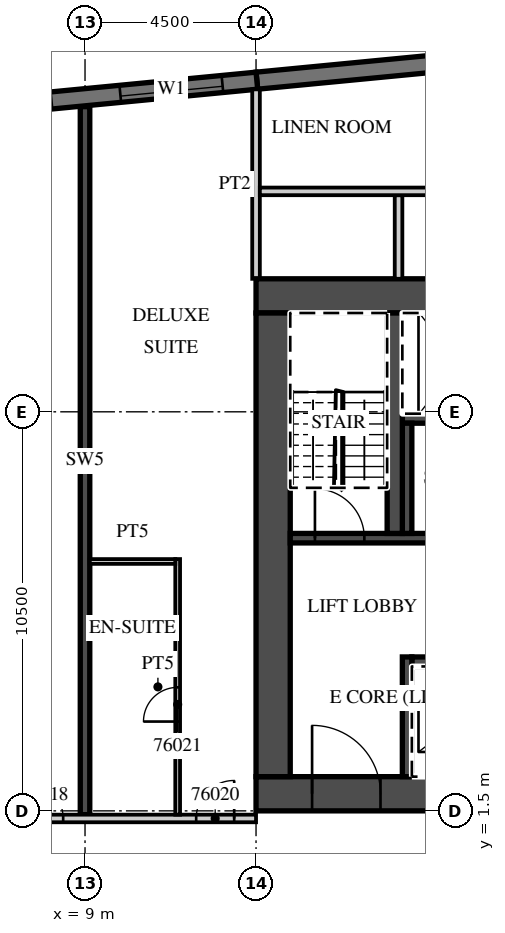
"""IFC4 building model, lengths in metres.
Left out: names, types, materials, properties, quantities, classifications, styles, units other than length and angle.
Written with IfcOpenShell. Run it as: python <this file> out.ifc"""

import sys

from ifc_helpers import new_model, si_unit, direction, frame, frame_2d, origin, place, context, subcontext, project, spatial, rectangle, extrude, element, fill, save


model = new_model("IFC4")
c1 = context("Model", 3, precision=1e-05, world=origin(), true_north=direction((0.0, 1.0)))
c2 = subcontext(c1, "Body", "Model", "MODEL_VIEW")
j1 = project(units=[si_unit("LENGTHUNIT", "METRE"), si_unit("PLANEANGLEUNIT", "RADIAN")], contexts=[c1])
p1 = place(None, origin())
s1 = spatial("IfcSite", under=j1, at=p1, CompositionType="ELEMENT")
p2 = place(p1, origin())
s2 = spatial("IfcBuilding", under=s1, at=p2, CompositionType="ELEMENT")
p3 = place(p2, frame((0.0, 0.0, 301.5)))
s3 = spatial("IfcBuildingStorey", under=s2, at=p3, CompositionType="ELEMENT", Elevation=301.5)
p4 = place(p3, frame((9.0, 1.4, 0.0), z_axis=(0.0, 0.0, 1.0), x_axis=(0.0, 1.0, 0.0)))
e1 = element("IfcWall", 1, at=p4, inside=s3, PredefinedType="SHEAR", context=c2, shape_type="SweptSolid", body=[
    extrude(rectangle(XDim=18.629, YDim=0.25, at=frame_2d((9.315, 0.0))), origin(), (0.0, 0.0, 1.0), 3.3),
])
p5 = place(p3, frame((30.946, 22.391, 0.0), z_axis=(0.0, 0.0, 1.0), x_axis=(-0.995396397117, -0.095843688398, 0.0)))
e2 = element("IfcWall", 2, at=p5, inside=s3, PredefinedType="SOLIDWALL", context=c2, shape_type="SweptSolid", body=[
    extrude(rectangle(XDim=17.505, YDim=0.45, at=frame_2d((8.752, 0.0))), origin(), (0.0, 0.0, 1.0), 3.02),
])
p6 = place(p3, frame((13.521, 20.713, 0.0), z_axis=(0.0, 0.0, 1.0), x_axis=(-0.995396277313, -0.095844932638, 0.0)))
e3 = element("IfcWall", 3, at=p6, inside=s3, PredefinedType="SOLIDWALL", context=c2, shape_type="SweptSolid", body=[
    extrude(rectangle(XDim=51.495, YDim=0.45, at=frame_2d((25.748, 0.0))), origin(), (0.0, 0.0, 1.0), 3.02),
])
p7 = place(p6, frame((0.91, 0.0, 0.45)))
e4 = element("IfcOpeningElement", 4, at=p7, cuts=e3, PredefinedType="OPENING", context=c2, shape_type="SweptSolid", body=[
    extrude(rectangle(XDim=2.7, YDim=2.25, at=frame_2d((1.35, 1.125))), frame((0.0, 0.235, 0.0), z_axis=(0.0, -1.0, 0.0), x_axis=(1.0, 0.0, 0.0)), (0.0, 0.0, 1.0), 0.47),
])
p8 = place(p6, frame((5.431, 0.0, 0.45)))
e5 = element("IfcOpeningElement", 5, at=p8, cuts=e3, PredefinedType="OPENING", context=c2, shape_type="SweptSolid", body=[
    extrude(rectangle(XDim=2.7, YDim=2.25, at=frame_2d((1.35, 1.125))), frame((0.0, 0.235, 0.0), z_axis=(0.0, -1.0, 0.0), x_axis=(1.0, 0.0, 0.0)), (0.0, 0.0, 1.0), 0.47),
])
p9 = place(p6, frame((9.952, 0.0, 0.45)))
e6 = element("IfcOpeningElement", 6, at=p9, cuts=e3, PredefinedType="OPENING", context=c2, shape_type="SweptSolid", body=[
    extrude(rectangle(XDim=2.7, YDim=2.25, at=frame_2d((1.35, 1.125))), frame((0.0, 0.235, 0.0), z_axis=(0.0, -1.0, 0.0), x_axis=(1.0, 0.0, 0.0)), (0.0, 0.0, 1.0), 0.47),
])
p10 = place(p6, frame((14.473, 0.0, 0.45)))
e7 = element("IfcOpeningElement", 7, at=p10, cuts=e3, PredefinedType="OPENING", context=c2, shape_type="SweptSolid", body=[
    extrude(rectangle(XDim=2.7, YDim=2.25, at=frame_2d((1.35, 1.125))), frame((0.0, 0.235, 0.0), z_axis=(0.0, -1.0, 0.0), x_axis=(1.0, 0.0, 0.0)), (0.0, 0.0, 1.0), 0.47),
])
p11 = place(p6, frame((18.994, 0.0, 0.45)))
e8 = element("IfcOpeningElement", 8, at=p11, cuts=e3, PredefinedType="OPENING", context=c2, shape_type="SweptSolid", body=[
    extrude(rectangle(XDim=2.7, YDim=2.25, at=frame_2d((1.35, 1.125))), frame((0.0, 0.235, 0.0), z_axis=(0.0, -1.0, 0.0), x_axis=(1.0, 0.0, 0.0)), (0.0, 0.0, 1.0), 0.47),
])
p12 = place(p6, frame((23.514, 0.0, 0.45)))
e9 = element("IfcOpeningElement", 9, at=p12, cuts=e3, PredefinedType="OPENING", context=c2, shape_type="SweptSolid", body=[
    extrude(rectangle(XDim=2.7, YDim=2.25, at=frame_2d((1.35, 1.125))), frame((0.0, 0.235, 0.0), z_axis=(0.0, -1.0, 0.0), x_axis=(1.0, 0.0, 0.0)), (0.0, 0.0, 1.0), 0.47),
])
p13 = place(p6, frame((28.035, 0.0, 0.45)))
e10 = element("IfcOpeningElement", 10, at=p13, cuts=e3, PredefinedType="OPENING", context=c2, shape_type="SweptSolid", body=[
    extrude(rectangle(XDim=2.7, YDim=2.25, at=frame_2d((1.35, 1.125))), frame((0.0, 0.235, 0.0), z_axis=(0.0, -1.0, 0.0), x_axis=(1.0, 0.0, 0.0)), (0.0, 0.0, 1.0), 0.47),
])
p14 = place(p6, frame((32.556, 0.0, 0.45)))
e11 = element("IfcOpeningElement", 11, at=p14, cuts=e3, PredefinedType="OPENING", context=c2, shape_type="SweptSolid", body=[
    extrude(rectangle(XDim=2.7, YDim=2.25, at=frame_2d((1.35, 1.125))), frame((0.0, 0.235, 0.0), z_axis=(0.0, -1.0, 0.0), x_axis=(1.0, 0.0, 0.0)), (0.0, 0.0, 1.0), 0.47),
])
p15 = place(p6, frame((37.077, 0.0, 0.45)))
e12 = element("IfcOpeningElement", 12, at=p15, cuts=e3, PredefinedType="OPENING", context=c2, shape_type="SweptSolid", body=[
    extrude(rectangle(XDim=2.7, YDim=2.25, at=frame_2d((1.35, 1.125))), frame((0.0, 0.235, 0.0), z_axis=(0.0, -1.0, 0.0), x_axis=(1.0, 0.0, 0.0)), (0.0, 0.0, 1.0), 0.47),
])
p16 = place(p6, frame((41.598, 0.0, 0.45)))
e13 = element("IfcOpeningElement", 13, at=p16, cuts=e3, PredefinedType="OPENING", context=c2, shape_type="SweptSolid", body=[
    extrude(rectangle(XDim=2.7, YDim=2.25, at=frame_2d((1.35, 1.125))), frame((0.0, 0.235, 0.0), z_axis=(0.0, -1.0, 0.0), x_axis=(1.0, 0.0, 0.0)), (0.0, 0.0, 1.0), 0.47),
])
p17 = place(p6, frame((46.118, 0.0, 0.45)))
e14 = element("IfcOpeningElement", 14, at=p17, cuts=e3, PredefinedType="OPENING", context=c2, shape_type="SweptSolid", body=[
    extrude(rectangle(XDim=2.7, YDim=2.25, at=frame_2d((1.35, 1.125))), frame((0.0, 0.235, 0.0), z_axis=(0.0, -1.0, 0.0), x_axis=(1.0, 0.0, 0.0)), (0.0, 0.0, 1.0), 0.47),
])
p18 = place(p3, frame((13.5, 15.5, 0.0), z_axis=(0.0, 0.0, 1.0), x_axis=(0.0, 1.0, 0.0)))
e15 = element("IfcWall", 15, at=p18, inside=s3, PredefinedType="PARTITIONING", context=c2, shape_type="SweptSolid", body=[
    extrude(rectangle(XDim=4.985, YDim=0.2, at=frame_2d((2.493, 0.0))), origin(), (0.0, 0.0, 1.0), 3.02),
])
p19 = place(p3, frame((-39.909, 1.3, 0.0), z_axis=(0.0, 0.0, 1.0), x_axis=(1.0, 0.0, 0.0)))
e16 = element("IfcWall", 16, at=p19, inside=s3, PredefinedType="PARTITIONING", context=c2, shape_type="SweptSolid", body=[
    extrude(rectangle(XDim=53.409, YDim=0.2, at=frame_2d((26.705, 0.0))), origin(), (0.0, 0.0, 1.0), 3.02),
])
p20 = place(p19, frame((0.15, 0.0, 0.0)))
e17 = element("IfcOpeningElement", 17, at=p20, cuts=e16, PredefinedType="OPENING", context=c2, shape_type="SweptSolid", body=[
    extrude(rectangle(XDim=0.9, YDim=2.1, at=frame_2d((0.45, 1.05))), frame((0.0, 0.11, 0.0), z_axis=(0.0, -1.0, 0.0), x_axis=(1.0, 0.0, 0.0)), (0.0, 0.0, 1.0), 0.22),
])
p21 = place(p19, frame((9.271, 0.0, 0.0)))
e18 = element("IfcOpeningElement", 18, at=p21, cuts=e16, PredefinedType="OPENING", context=c2, shape_type="SweptSolid", body=[
    extrude(rectangle(XDim=1.2, YDim=2.1, at=frame_2d((0.6, 1.05))), frame((0.0, 0.11, 0.0), z_axis=(0.0, -1.0, 0.0), x_axis=(1.0, 0.0, 0.0)), (0.0, 0.0, 1.0), 0.22),
])
p22 = place(p19, frame((13.484, 0.0, 0.0)))
e19 = element("IfcOpeningElement", 19, at=p22, cuts=e16, PredefinedType="OPENING", context=c2, shape_type="SweptSolid", body=[
    extrude(rectangle(XDim=1.0, YDim=2.1, at=frame_2d((0.5, 1.05))), frame((0.0, 0.11, 0.0), z_axis=(0.0, -1.0, 0.0), x_axis=(1.0, 0.0, 0.0)), (0.0, 0.0, 1.0), 0.22),
])
p23 = place(p19, frame((17.959, 0.0, 0.0)))
e20 = element("IfcOpeningElement", 20, at=p23, cuts=e16, PredefinedType="OPENING", context=c2, shape_type="SweptSolid", body=[
    extrude(rectangle(XDim=1.0, YDim=2.1, at=frame_2d((0.5, 1.05))), frame((0.0, 0.11, 0.0), z_axis=(0.0, -1.0, 0.0), x_axis=(1.0, 0.0, 0.0)), (0.0, 0.0, 1.0), 0.22),
])
p24 = place(p19, frame((24.859, 0.0, 0.0)))
e21 = element("IfcOpeningElement", 21, at=p24, cuts=e16, PredefinedType="OPENING", context=c2, shape_type="SweptSolid", body=[
    extrude(rectangle(XDim=1.0, YDim=2.1, at=frame_2d((0.5, 1.05))), frame((0.0, 0.11, 0.0), z_axis=(0.0, -1.0, 0.0), x_axis=(1.0, 0.0, 0.0)), (0.0, 0.0, 1.0), 0.22),
])
p25 = place(p19, frame((29.334, 0.0, 0.0)))
e22 = element("IfcOpeningElement", 22, at=p25, cuts=e16, PredefinedType="OPENING", context=c2, shape_type="SweptSolid", body=[
    extrude(rectangle(XDim=1.0, YDim=2.1, at=frame_2d((0.5, 1.05))), frame((0.0, 0.11, 0.0), z_axis=(0.0, -1.0, 0.0), x_axis=(1.0, 0.0, 0.0)), (0.0, 0.0, 1.0), 0.22),
])
p26 = place(p19, frame((36.271, 0.0, 0.0)))
e23 = element("IfcOpeningElement", 23, at=p26, cuts=e16, PredefinedType="OPENING", context=c2, shape_type="SweptSolid", body=[
    extrude(rectangle(XDim=1.2, YDim=2.1, at=frame_2d((0.6, 1.05))), frame((0.0, 0.11, 0.0), z_axis=(0.0, -1.0, 0.0), x_axis=(1.0, 0.0, 0.0)), (0.0, 0.0, 1.0), 0.22),
])
p27 = place(p19, frame((40.484, 0.0, 0.0)))
e24 = element("IfcOpeningElement", 24, at=p27, cuts=e16, PredefinedType="OPENING", context=c2, shape_type="SweptSolid", body=[
    extrude(rectangle(XDim=1.0, YDim=2.1, at=frame_2d((0.5, 1.05))), frame((0.0, 0.11, 0.0), z_axis=(0.0, -1.0, 0.0), x_axis=(1.0, 0.0, 0.0)), (0.0, 0.0, 1.0), 0.22),
])
p28 = place(p19, frame((47.334, 0.0, 0.0)))
e25 = element("IfcOpeningElement", 25, at=p28, cuts=e16, PredefinedType="OPENING", context=c2, shape_type="SweptSolid", body=[
    extrude(rectangle(XDim=1.0, YDim=2.1, at=frame_2d((0.5, 1.05))), frame((0.0, 0.11, 0.0), z_axis=(0.0, -1.0, 0.0), x_axis=(1.0, 0.0, 0.0)), (0.0, 0.0, 1.0), 0.22),
])
p29 = place(p19, frame((51.834, 0.0, 0.0)))
e26 = element("IfcOpeningElement", 26, at=p29, cuts=e16, PredefinedType="OPENING", context=c2, shape_type="SweptSolid", body=[
    extrude(rectangle(XDim=1.0, YDim=2.1, at=frame_2d((0.5, 1.05))), frame((0.0, 0.11, 0.0), z_axis=(0.0, -1.0, 0.0), x_axis=(1.0, 0.0, 0.0)), (0.0, 0.0, 1.0), 0.22),
])
p30 = place(p3, frame((11.438, 1.4, 0.0), z_axis=(0.0, 0.0, 1.0), x_axis=(0.0, 1.0, 0.0)))
e27 = element("IfcWall", 27, at=p30, inside=s3, PredefinedType="PARTITIONING", context=c2, shape_type="SweptSolid", body=[
    extrude(rectangle(XDim=6.725, YDim=0.125, at=frame_2d((3.363, 0.0))), origin(), (0.0, 0.0, 1.0), 3.02),
])
p31 = place(p30, frame((2.45, 0.0, 0.0)))
e28 = element("IfcOpeningElement", 28, at=p31, cuts=e27, PredefinedType="OPENING", context=c2, shape_type="SweptSolid", body=[
    extrude(rectangle(XDim=0.9, YDim=2.1, at=frame_2d((0.45, 1.05))), frame((0.0, 0.073, 0.0), z_axis=(0.0, -1.0, 0.0), x_axis=(1.0, 0.0, 0.0)), (0.0, 0.0, 1.0), 0.145),
])
p32 = place(p3, frame((9.125, 8.062, 0.0), z_axis=(0.0, 0.0, 1.0), x_axis=(1.0, 0.0, 0.0)))
e29 = element("IfcWall", 29, at=p32, inside=s3, PredefinedType="PARTITIONING", context=c2, shape_type="SweptSolid", body=[
    extrude(rectangle(XDim=2.25, YDim=0.125, at=frame_2d((1.125, 0.0))), origin(), (0.0, 0.0, 1.0), 3.02),
])
p33 = place(p3, frame((13.5, 1.95, 0.0), z_axis=(0.0, 0.0, 1.0), x_axis=(1.0, 0.0, 0.0)))
e30 = element("IfcWall", 30, at=p33, inside=s3, PredefinedType="SHEAR", context=c2, shape_type="SweptSolid", body=[
    extrude(rectangle(XDim=18.0, YDim=0.9, at=frame_2d((9.0, 0.0))), origin(), (0.0, 0.0, 1.0), 3.02),
])
p34 = place(p33, frame((1.475, 0.0, 0.0)))
e31 = element("IfcOpeningElement", 31, at=p34, cuts=e30, PredefinedType="OPENING", context=c2, shape_type="SweptSolid", body=[
    extrude(rectangle(XDim=1.8, YDim=2.1, at=frame_2d((0.9, 1.05))), frame((0.0, 0.46, 0.0), z_axis=(0.0, -1.0, 0.0), x_axis=(1.0, 0.0, 0.0)), (0.0, 0.0, 1.0), 0.92),
])
p35 = place(p3, frame((13.5, 15.05, 0.0), z_axis=(0.0, 0.0, 1.0), x_axis=(1.0, 0.0, 0.0)))
e32 = element("IfcWall", 32, at=p35, inside=s3, PredefinedType="SHEAR", context=c2, shape_type="SweptSolid", body=[
    extrude(rectangle(XDim=6.8, YDim=0.9, at=frame_2d((3.4, 0.0))), origin(), (0.0, 0.0, 1.0), 3.02),
])
p36 = place(p35, frame((4.725, 0.0, 0.0)))
e33 = element("IfcOpeningElement", 33, at=p36, cuts=e32, PredefinedType="OPENING", context=c2, shape_type="SweptSolid", body=[
    extrude(rectangle(XDim=1.2, YDim=2.1, at=frame_2d((0.6, 1.05))), frame((0.0, 0.46, 0.0), z_axis=(0.0, -1.0, 0.0), x_axis=(1.0, 0.0, 0.0)), (0.0, 0.0, 1.0), 0.92),
])
p37 = place(p3, frame((13.95, 2.4, 0.0), z_axis=(0.0, 0.0, 1.0), x_axis=(0.0, 1.0, 0.0)))
e34 = element("IfcWall", 34, at=p37, inside=s3, PredefinedType="SHEAR", context=c2, shape_type="SweptSolid", body=[
    extrude(rectangle(XDim=12.2, YDim=0.9, at=frame_2d((6.1, 0.0))), origin(), (0.0, 0.0, 1.0), 3.02),
])
p38 = place(p3, frame((17.6, 5.425, 0.0), z_axis=(0.0, 0.0, 1.0), x_axis=(1.0, 0.0, 0.0)))
e35 = element("IfcWall", 35, at=p38, inside=s3, PredefinedType="SHEAR", context=c2, shape_type="SweptSolid", body=[
    extrude(rectangle(XDim=13.0, YDim=0.25, at=frame_2d((6.5, 0.0))), origin(), (0.0, 0.0, 1.0), 3.02),
])
p39 = place(p38, frame((3.275, 0.0, 0.0)))
e36 = element("IfcOpeningElement", 36, at=p39, cuts=e35, PredefinedType="OPENING", context=c2, shape_type="SweptSolid", body=[
    extrude(rectangle(XDim=1.2, YDim=2.1, at=frame_2d((0.6, 1.05))), frame((0.0, 0.135, 0.0), z_axis=(0.0, -1.0, 0.0), x_axis=(1.0, 0.0, 0.0)), (0.0, 0.0, 1.0), 0.27),
])
p40 = place(p38, frame((0.625, 0.0, 0.0)))
e37 = element("IfcOpeningElement", 37, at=p40, cuts=e35, PredefinedType="OPENING", context=c2, shape_type="SweptSolid", body=[
    extrude(rectangle(XDim=1.2, YDim=2.1, at=frame_2d((0.6, 1.05))), frame((0.0, 0.135, 0.0), z_axis=(0.0, -1.0, 0.0), x_axis=(1.0, 0.0, 0.0)), (0.0, 0.0, 1.0), 0.27),
])
p41 = place(p38, frame((7.275, 0.0, 0.0)))
e38 = element("IfcOpeningElement", 38, at=p41, cuts=e35, PredefinedType="OPENING", context=c2, shape_type="SweptSolid", body=[
    extrude(rectangle(XDim=1.0, YDim=2.1, at=frame_2d((0.5, 1.05))), frame((0.0, 0.135, 0.0), z_axis=(0.0, -1.0, 0.0), x_axis=(1.0, 0.0, 0.0)), (0.0, 0.0, 1.0), 0.27),
])
p42 = place(p3, frame((17.475, 2.4, 0.0), z_axis=(0.0, 0.0, 1.0), x_axis=(0.0, 1.0, 0.0)))
e39 = element("IfcWall", 39, at=p42, inside=s3, PredefinedType="SHEAR", context=c2, shape_type="SweptSolid", body=[
    extrude(rectangle(XDim=3.15, YDim=0.25, at=frame_2d((1.575, 0.0))), origin(), (0.0, 0.0, 1.0), 3.02),
])
p43 = place(p3, frame((14.4, 8.675, 0.0), z_axis=(0.0, 0.0, 1.0), x_axis=(1.0, 0.0, 0.0)))
e40 = element("IfcWall", 40, at=p43, inside=s3, PredefinedType="SHEAR", context=c2, shape_type="SweptSolid", body=[
    extrude(rectangle(XDim=16.2, YDim=0.25, at=frame_2d((8.1, 0.0))), origin(), (0.0, 0.0, 1.0), 3.02),
])
p44 = place(p43, frame((0.65, 0.0, 0.0)))
e41 = element("IfcOpeningElement", 41, at=p44, cuts=e40, PredefinedType="OPENING", context=c2, shape_type="SweptSolid", body=[
    extrude(rectangle(XDim=1.3, YDim=2.1, at=frame_2d((0.65, 1.05))), frame((0.0, 0.135, 0.0), z_axis=(0.0, -1.0, 0.0), x_axis=(1.0, 0.0, 0.0)), (0.0, 0.0, 1.0), 0.27),
])
p45 = place(p43, frame((12.962, 0.0, 0.0)))
e42 = element("IfcOpeningElement", 42, at=p45, cuts=e40, PredefinedType="OPENING", context=c2, shape_type="SweptSolid", body=[
    extrude(rectangle(XDim=1.0, YDim=2.1, at=frame_2d((0.5, 1.05))), frame((0.0, 0.135, 0.0), z_axis=(0.0, -1.0, 0.0), x_axis=(1.0, 0.0, 0.0)), (0.0, 0.0, 1.0), 0.27),
])
p46 = place(p43, frame((8.1, 0.0, 0.0)))
e43 = element("IfcOpeningElement", 43, at=p46, cuts=e40, PredefinedType="OPENING", context=c2, shape_type="SweptSolid", body=[
    extrude(rectangle(XDim=1.0, YDim=2.1, at=frame_2d((0.5, 1.05))), frame((0.0, 0.135, 0.0), z_axis=(0.0, -1.0, 0.0), x_axis=(1.0, 0.0, 0.0)), (0.0, 0.0, 1.0), 0.27),
])
p47 = place(p43, frame((4.212, 0.0, 0.0)))
e44 = element("IfcOpeningElement", 44, at=p47, cuts=e40, PredefinedType="OPENING", context=c2, shape_type="SweptSolid", body=[
    extrude(rectangle(XDim=1.0, YDim=2.1, at=frame_2d((0.5, 1.05))), frame((0.0, 0.135, 0.0), z_axis=(0.0, -1.0, 0.0), x_axis=(1.0, 0.0, 0.0)), (0.0, 0.0, 1.0), 0.27),
])
p48 = place(p3, frame((17.35, 11.825, 0.0), z_axis=(0.0, 0.0, 1.0), x_axis=(1.0, 0.0, 0.0)))
e45 = element("IfcWall", 45, at=p48, inside=s3, PredefinedType="SHEAR", context=c2, shape_type="SweptSolid", body=[
    extrude(rectangle(XDim=13.25, YDim=0.25, at=frame_2d((6.625, 0.0))), origin(), (0.0, 0.0, 1.0), 3.02),
])
p49 = place(p3, frame((17.475, 8.8, 0.0), z_axis=(0.0, 0.0, 1.0), x_axis=(0.0, 1.0, 0.0)))
e46 = element("IfcWall", 46, at=p49, inside=s3, PredefinedType="SHEAR", context=c2, shape_type="SweptSolid", body=[
    extrude(rectangle(XDim=2.9, YDim=0.25, at=frame_2d((1.45, 0.0))), origin(), (0.0, 0.0, 1.0), 3.02),
])
p50 = place(p3, frame((17.15, 8.8, 0.0), z_axis=(0.0, 0.0, 1.0), x_axis=(0.0, 1.0, 0.0)))
e47 = element("IfcWall", 47, at=p50, inside=s3, PredefinedType="SHEAR", context=c2, shape_type="SweptSolid", body=[
    extrude(rectangle(XDim=5.8, YDim=0.4, at=frame_2d((2.9, 0.0))), origin(), (0.0, 0.0, 1.0), 3.02),
])
p51 = place(p3, frame((17.25, 15.5, 0.0), z_axis=(0.0, 0.0, 1.0), x_axis=(0.0, 1.0, 0.0)))
e48 = element("IfcWall", 48, at=p51, inside=s3, PredefinedType="PARTITIONING", context=c2, shape_type="SweptSolid", body=[
    extrude(rectangle(XDim=2.2, YDim=0.2, at=frame_2d((1.1, 0.0))), origin(), (0.0, 0.0, 1.0), 3.02),
])
p52 = place(p3, frame((13.6, 17.8, 0.0), z_axis=(0.0, 0.0, 1.0), x_axis=(1.0, 0.0, 0.0)))
e49 = element("IfcWall", 49, at=p52, inside=s3, PredefinedType="PARTITIONING", context=c2, shape_type="SweptSolid", body=[
    extrude(rectangle(XDim=21.354, YDim=0.2, at=frame_2d((10.677, 0.0))), origin(), (0.0, 0.0, 1.0), 3.02),
])
p53 = place(p52, frame((16.613, 0.0, 0.0)))
e50 = element("IfcOpeningElement", 50, at=p53, cuts=e49, PredefinedType="OPENING", context=c2, shape_type="SweptSolid", body=[
    extrude(rectangle(XDim=0.9, YDim=2.1, at=frame_2d((0.45, 1.05))), frame((0.0, 0.11, 0.0), z_axis=(0.0, -1.0, 0.0), x_axis=(1.0, 0.0, 0.0)), (0.0, 0.0, 1.0), 0.22),
])
p54 = place(p52, frame((8.312, 0.0, 0.0)))
e51 = element("IfcOpeningElement", 51, at=p54, cuts=e49, PredefinedType="OPENING", context=c2, shape_type="SweptSolid", body=[
    extrude(rectangle(XDim=0.9, YDim=2.1, at=frame_2d((0.45, 1.05))), frame((0.0, 0.11, 0.0), z_axis=(0.0, -1.0, 0.0), x_axis=(1.0, 0.0, 0.0)), (0.0, 0.0, 1.0), 0.22),
])
p55 = place(p7, origin())
e52 = element("IfcWindow", 52, at=p55, inside=s3, PartitioningType="SINGLE_PANEL", PredefinedType="WINDOW", context=c2, shape_type="SweptSolid", body=[
    extrude(rectangle(XDim=2.7, YDim=2.25, at=frame_2d((1.35, 1.125))), frame((0.0, 0.09, 0.0), z_axis=(0.0, -1.0, 0.0), x_axis=(1.0, 0.0, 0.0)), (0.0, 0.0, 1.0), 0.06),
])
fill(e4, e52)
p56 = place(p28, origin())
e53 = element("IfcDoor", 53, at=p56, inside=s3, OperationType="SINGLE_SWING_LEFT", PredefinedType="DOOR", context=c2, shape_type="SweptSolid", body=[
    extrude(rectangle(XDim=1.0, YDim=2.1, at=frame_2d((0.5, 1.05))), frame((0.0, 0.025, 0.0), z_axis=(0.0, -1.0, 0.0), x_axis=(1.0, 0.0, 0.0)), (0.0, 0.0, 1.0), 0.05),
])
fill(e25, e53)
p57 = place(p29, origin())
e54 = element("IfcDoor", 54, at=p57, inside=s3, OperationType="SINGLE_SWING_RIGHT", PredefinedType="DOOR", context=c2, shape_type="SweptSolid", body=[
    extrude(rectangle(XDim=1.0, YDim=2.1, at=frame_2d((0.5, 1.05))), frame((0.0, 0.025, 0.0), z_axis=(0.0, -1.0, 0.0), x_axis=(1.0, 0.0, 0.0)), (0.0, 0.0, 1.0), 0.05),
])
fill(e26, e54)
p58 = place(p31, origin())
e55 = element("IfcDoor", 55, at=p58, inside=s3, OperationType="SINGLE_SWING_LEFT", PredefinedType="DOOR", context=c2, shape_type="SweptSolid", body=[
    extrude(rectangle(XDim=0.9, YDim=2.1, at=frame_2d((0.45, 1.05))), frame((0.0, 0.025, 0.0), z_axis=(0.0, -1.0, 0.0), x_axis=(1.0, 0.0, 0.0)), (0.0, 0.0, 1.0), 0.05),
])
fill(e28, e55)
p59 = place(p34, origin())
e56 = element("IfcDoor", 56, at=p59, inside=s3, OperationType="DOUBLE_DOOR_DOUBLE_SWING", PredefinedType="DOOR", context=c2, shape_type="SweptSolid", body=[
    extrude(rectangle(XDim=1.8, YDim=2.1, at=frame_2d((0.9, 1.05))), frame((0.0, 0.025, 0.0), z_axis=(0.0, -1.0, 0.0), x_axis=(1.0, 0.0, 0.0)), (0.0, 0.0, 1.0), 0.05),
])
fill(e31, e56)
p60 = place(p44, origin())
e57 = element("IfcDoor", 57, at=p60, inside=s3, OperationType="SINGLE_SWING_LEFT", PredefinedType="DOOR", context=c2, shape_type="SweptSolid", body=[
    extrude(rectangle(XDim=1.3, YDim=2.1, at=frame_2d((0.65, 1.05))), frame((0.0, 0.025, 0.0), z_axis=(0.0, -1.0, 0.0), x_axis=(1.0, 0.0, 0.0)), (0.0, 0.0, 1.0), 0.05),
])
fill(e41, e57)
save(model, sys.argv[1])
